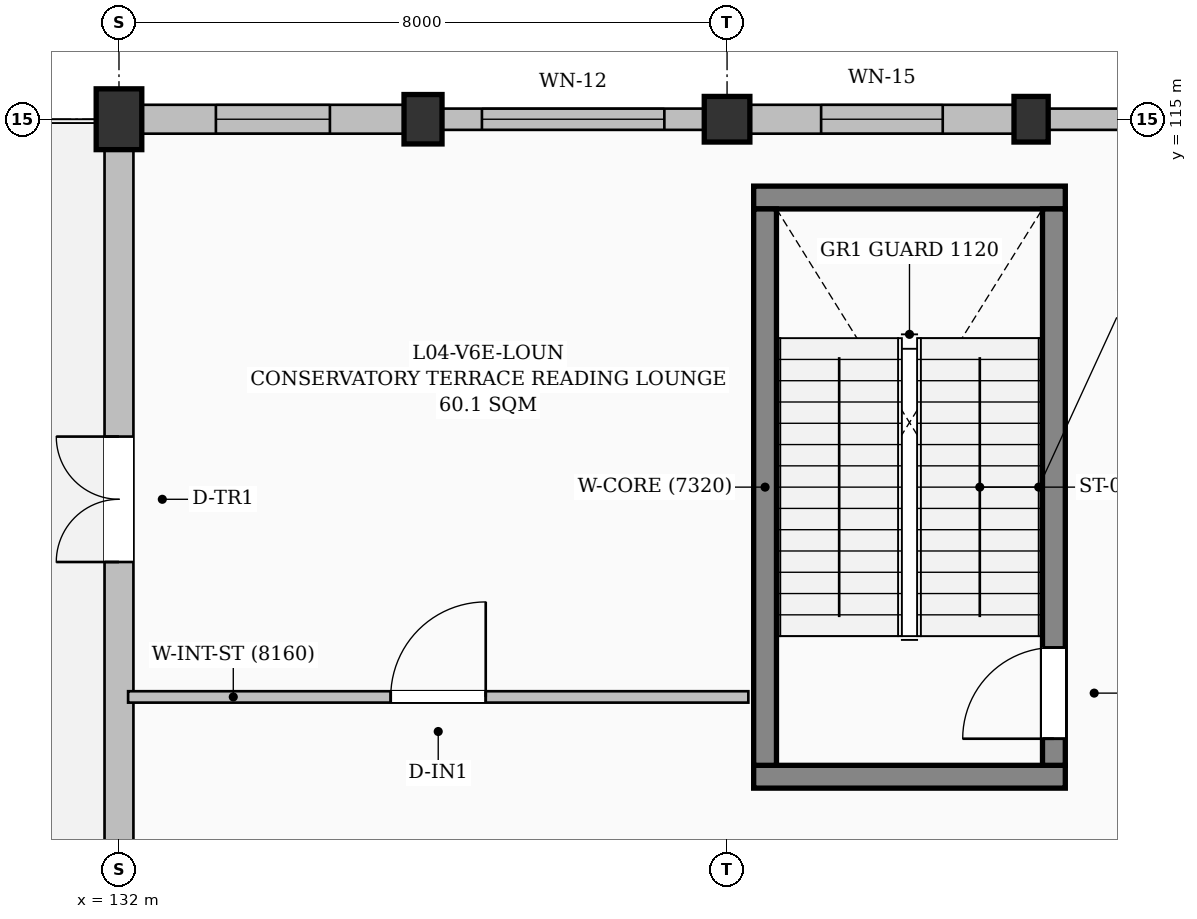
"""IFC4 building model, lengths in metres.
Left out: names, types, materials, properties, quantities, classifications, styles, units other than length and angle.
Written with IfcOpenShell. Run it as: python <this file> out.ifc"""

import sys

from ifc_helpers import new_model, si_unit, direction, frame, frame_2d, origin, origin_2d, place, context, subcontext, project, spatial, rectangle, extrude, element, fill, save


model = new_model("IFC4")
c1 = context("Model", 3, precision=1e-05, world=origin(), true_north=direction((0.0, 1.0)))
c2 = subcontext(c1, "Body", "Model", "MODEL_VIEW")
j1 = project(units=[si_unit("LENGTHUNIT", "METRE"), si_unit("PLANEANGLEUNIT", "RADIAN")], contexts=[c1])
p1 = place(None, origin())
s1 = spatial("IfcSite", under=j1, at=p1, CompositionType="ELEMENT")
p2 = place(p1, origin())
s2 = spatial("IfcBuilding", under=s1, at=p2, CompositionType="ELEMENT")
p3 = place(p2, frame((0.0, 0.0, 18.3)))
s3 = spatial("IfcBuildingStorey", under=s2, at=p3, CompositionType="ELEMENT", Elevation=18.3)
p4 = place(p3, frame((132.0, 115.0, 0.0), z_axis=(0.0, 0.0, 1.0), x_axis=(1.0, 0.0, 0.0)))
e1 = element("IfcColumn", 1, at=p4, inside=s3, PredefinedType="COLUMN", context=c2, shape_type="SweptSolid", body=[
    extrude(rectangle(XDim=0.6, YDim=0.8, at=origin_2d()), origin(), (0.0, 0.0, 1.0), 4.5),
])
p5 = place(p3, frame((136.0, 115.0, 0.0), z_axis=(0.0, 0.0, 1.0), x_axis=(1.0, 0.0, 0.0)))
e2 = element("IfcColumn", 2, at=p5, inside=s3, PredefinedType="PILASTER", context=c2, shape_type="SweptSolid", body=[
    extrude(rectangle(XDim=0.5, YDim=0.65, at=origin_2d()), origin(), (0.0, 0.0, 1.0), 4.5),
])
p6 = place(p3, frame((140.0, 115.0, 0.0), z_axis=(0.0, 0.0, 1.0), x_axis=(1.0, 0.0, 0.0)))
e3 = element("IfcColumn", 3, at=p6, inside=s3, PredefinedType="COLUMN", context=c2, shape_type="SweptSolid", body=[
    extrude(rectangle(XDim=0.6, YDim=0.6, at=origin_2d()), origin(), (0.0, 0.0, 1.0), 4.5),
])
p7 = place(p3, frame((144.0, 115.0, 0.0), z_axis=(0.0, 0.0, 1.0), x_axis=(1.0, 0.0, 0.0)))
e4 = element("IfcColumn", 4, at=p7, inside=s3, PredefinedType="PILASTER", context=c2, shape_type="SweptSolid", body=[
    extrude(rectangle(XDim=0.45, YDim=0.6, at=origin_2d()), origin(), (0.0, 0.0, 1.0), 4.5),
])
p8 = place(p3, frame((132.0, 105.4, 0.0), z_axis=(0.0, 0.0, 1.0), x_axis=(0.0, 1.0, 0.0)))
e5 = element("IfcWall", 5, at=p8, inside=s3, PredefinedType="SOLIDWALL", context=c2, shape_type="SweptSolid", body=[
    extrude(rectangle(XDim=9.2, YDim=0.38, at=frame_2d((4.6, 0.0))), origin(), (0.0, 0.0, 1.0), 4.2),
])
p9 = place(p8, frame((3.775, 0.0, 0.0)))
e6 = element("IfcOpeningElement", 6, at=p9, cuts=e5, PredefinedType="OPENING", context=c2, shape_type="SweptSolid", body=[
    extrude(rectangle(XDim=1.65, YDim=2.25, at=frame_2d((0.825, 1.125))), frame((0.0, 0.2, 0.0), z_axis=(0.0, -1.0, 0.0), x_axis=(1.0, 0.0, 0.0)), (0.0, 0.0, 1.0), 0.4),
])
p10 = place(p3, frame((132.3, 115.0, 0.0), z_axis=(0.0, 0.0, 1.0), x_axis=(1.0, 0.0, 0.0)))
e7 = element("IfcWall", 7, at=p10, inside=s3, PredefinedType="SOLIDWALL", context=c2, shape_type="SweptSolid", body=[
    extrude(rectangle(XDim=3.45, YDim=0.38, at=frame_2d((1.725, 0.0))), origin(), (0.0, 0.0, 1.0), 4.2),
])
p11 = place(p10, frame((0.975, 0.0, 0.95)))
e8 = element("IfcOpeningElement", 8, at=p11, cuts=e7, PredefinedType="OPENING", context=c2, shape_type="SweptSolid", body=[
    extrude(rectangle(XDim=1.5, YDim=1.5, at=frame_2d((0.75, 0.75))), frame((0.0, 0.2, 0.0), z_axis=(0.0, -1.0, 0.0), x_axis=(1.0, 0.0, 0.0)), (0.0, 0.0, 1.0), 0.4),
])
p12 = place(p3, frame((136.25, 115.0, 0.0), z_axis=(0.0, 0.0, 1.0), x_axis=(1.0, 0.0, 0.0)))
e9 = element("IfcWall", 9, at=p12, inside=s3, PredefinedType="SOLIDWALL", context=c2, shape_type="SweptSolid", body=[
    extrude(rectangle(XDim=3.45, YDim=0.28, at=frame_2d((1.725, 0.0))), origin(), (0.0, 0.0, 1.0), 4.2),
])
p13 = place(p12, frame((0.525, 0.0, 0.95)))
e10 = element("IfcOpeningElement", 10, at=p13, cuts=e9, PredefinedType="OPENING", context=c2, shape_type="SweptSolid", body=[
    extrude(rectangle(XDim=2.4, YDim=1.5, at=frame_2d((1.2, 0.75))), frame((0.0, 0.15, 0.0), z_axis=(0.0, -1.0, 0.0), x_axis=(1.0, 0.0, 0.0)), (0.0, 0.0, 1.0), 0.3),
])
p14 = place(p3, frame((140.3, 115.0, 0.0), z_axis=(0.0, 0.0, 1.0), x_axis=(1.0, 0.0, 0.0)))
e11 = element("IfcWall", 11, at=p14, inside=s3, PredefinedType="SOLIDWALL", context=c2, shape_type="SweptSolid", body=[
    extrude(rectangle(XDim=3.475, YDim=0.38, at=frame_2d((1.737, 0.0))), origin(), (0.0, 0.0, 1.0), 3.585),
])
p15 = place(p14, frame((0.938, 0.0, 0.95)))
e12 = element("IfcOpeningElement", 12, at=p15, cuts=e11, PredefinedType="OPENING", context=c2, shape_type="SweptSolid", body=[
    extrude(rectangle(XDim=1.6, YDim=1.2, at=frame_2d((0.8, 0.6))), frame((0.0, 0.2, 0.0), z_axis=(0.0, -1.0, 0.0), x_axis=(1.0, 0.0, 0.0)), (0.0, 0.0, 1.0), 0.4),
])
p16 = place(p3, frame((144.225, 115.0, 0.0), z_axis=(0.0, 0.0, 1.0), x_axis=(1.0, 0.0, 0.0)))
e13 = element("IfcWall", 13, at=p16, inside=s3, PredefinedType="SOLIDWALL", context=c2, shape_type="SweptSolid", body=[
    extrude(rectangle(XDim=3.475, YDim=0.28, at=frame_2d((1.737, 0.0))), origin(), (0.0, 0.0, 1.0), 3.585),
])
p17 = place(p16, frame((1.288, 0.0, 0.95)))
e14 = element("IfcOpeningElement", 14, at=p17, cuts=e13, PredefinedType="OPENING", context=c2, shape_type="SweptSolid", body=[
    extrude(rectangle(XDim=0.9, YDim=1.8, at=frame_2d((0.45, 0.9))), frame((0.0, 0.15, 0.0), z_axis=(0.0, -1.0, 0.0), x_axis=(1.0, 0.0, 0.0)), (0.0, 0.0, 1.0), 0.3),
])
for number, where, z_axis, x_axis in (
    (15, (140.35, 106.35, 0.0), (0.0, 0.0, 1.0), (1.0, 0.0, 0.0)),
    (16, (144.45, 113.97, 0.0), (0.0, 0.0, 1.0), (-1.0, 0.0, 0.0)),
):
    element("IfcWall", number, at=place(p3, frame(where, z_axis=z_axis, x_axis=x_axis)), inside=s3, PredefinedType="SHEAR", context=c2, shape_type="SweptSolid", body=[
        extrude(rectangle(XDim=4.1, YDim=0.3, at=frame_2d((2.05, 0.0))), origin(), (0.0, 0.0, 1.0), 4.2),
    ])
p18 = place(p3, frame((140.5, 106.5, 0.0), z_axis=(0.0, 0.0, 1.0), x_axis=(0.0, 1.0, 0.0)))
e17 = element("IfcWall", 17, at=p18, inside=s3, PredefinedType="SHEAR", context=c2, shape_type="SweptSolid", body=[
    extrude(rectangle(XDim=7.32, YDim=0.3, at=frame_2d((3.66, 0.0))), origin(), (0.0, 0.0, 1.0), 4.2),
])
p19 = place(p3, frame((144.3, 106.5, 0.0), z_axis=(0.0, 0.0, 1.0), x_axis=(0.0, 1.0, 0.0)))
e18 = element("IfcWall", 18, at=p19, inside=s3, PredefinedType="SHEAR", context=c2, shape_type="SweptSolid", body=[
    extrude(rectangle(XDim=7.32, YDim=0.3, at=frame_2d((3.66, 0.0))), origin(), (0.0, 0.0, 1.0), 4.2),
])
p20 = place(p19, frame((0.35, 0.0, 0.0)))
e19 = element("IfcOpeningElement", 19, at=p20, cuts=e18, PredefinedType="OPENING", context=c2, shape_type="SweptSolid", body=[
    extrude(rectangle(XDim=1.2, YDim=2.15, at=frame_2d((0.6, 1.075))), frame((0.0, 0.16, 0.0), z_axis=(0.0, -1.0, 0.0), x_axis=(1.0, 0.0, 0.0)), (0.0, 0.0, 1.0), 0.32),
])
p21 = place(p3, frame((132.12, 107.4, 0.0), z_axis=(0.0, 0.0, 1.0), x_axis=(1.0, 0.0, 0.0)))
e20 = element("IfcWall", 20, at=p21, inside=s3, PredefinedType="PARTITIONING", context=c2, shape_type="SweptSolid", body=[
    extrude(rectangle(XDim=8.16, YDim=0.15, at=frame_2d((4.08, 0.0))), origin(), (0.0, 0.0, 1.0), 4.2),
])
p22 = place(p21, frame((3.455, 0.0, 0.0)))
e21 = element("IfcOpeningElement", 21, at=p22, cuts=e20, PredefinedType="OPENING", context=c2, shape_type="SweptSolid", body=[
    extrude(rectangle(XDim=1.25, YDim=2.15, at=frame_2d((0.625, 1.075))), frame((0.0, 0.085, 0.0), z_axis=(0.0, -1.0, 0.0), x_axis=(1.0, 0.0, 0.0)), (0.0, 0.0, 1.0), 0.17),
])
p23 = place(p9, origin())
e22 = element("IfcDoor", 22, at=p23, inside=s3, OperationType="DOUBLE_DOOR_SINGLE_SWING", PredefinedType="DOOR", context=c2, shape_type="SweptSolid", body=[
    extrude(rectangle(XDim=1.65, YDim=2.25, at=frame_2d((0.825, 1.125))), frame((0.0, 0.025, 0.0), z_axis=(0.0, -1.0, 0.0), x_axis=(1.0, 0.0, 0.0)), (0.0, 0.0, 1.0), 0.05),
])
fill(e6, e22)
p24 = place(p11, origin())
e23 = element("IfcWindow", 23, at=p24, inside=s3, PartitioningType="DOUBLE_PANEL_VERTICAL", PredefinedType="WINDOW", context=c2, shape_type="SweptSolid", body=[
    extrude(rectangle(XDim=1.5, YDim=1.5, at=frame_2d((0.75, 0.75))), frame((0.0, 0.03, 0.0), z_axis=(0.0, -1.0, 0.0), x_axis=(1.0, 0.0, 0.0)), (0.0, 0.0, 1.0), 0.06),
])
fill(e8, e23)
p25 = place(p13, origin())
e24 = element("IfcWindow", 24, at=p25, inside=s3, PartitioningType="TRIPLE_PANEL_VERTICAL", PredefinedType="WINDOW", context=c2, shape_type="SweptSolid", body=[
    extrude(rectangle(XDim=2.4, YDim=1.5, at=frame_2d((1.2, 0.75))), frame((0.0, 0.03, 0.0), z_axis=(0.0, -1.0, 0.0), x_axis=(1.0, 0.0, 0.0)), (0.0, 0.0, 1.0), 0.06),
])
fill(e10, e24)
p26 = place(p15, origin())
e25 = element("IfcWindow", 25, at=p26, inside=s3, PartitioningType="DOUBLE_PANEL_HORIZONTAL", PredefinedType="WINDOW", context=c2, shape_type="SweptSolid", body=[
    extrude(rectangle(XDim=1.6, YDim=1.2, at=frame_2d((0.8, 0.6))), frame((0.0, 0.03, 0.0), z_axis=(0.0, -1.0, 0.0), x_axis=(1.0, 0.0, 0.0)), (0.0, 0.0, 1.0), 0.06),
])
fill(e12, e25)
p27 = place(p20, origin())
e26 = element("IfcDoor", 26, at=p27, inside=s3, OperationType="SINGLE_SWING_LEFT", PredefinedType="DOOR", context=c2, shape_type="SweptSolid", body=[
    extrude(rectangle(XDim=1.2, YDim=2.15, at=frame_2d((0.6, 1.075))), frame((0.0, 0.025, 0.0), z_axis=(0.0, -1.0, 0.0), x_axis=(1.0, 0.0, 0.0)), (0.0, 0.0, 1.0), 0.05),
])
fill(e19, e26)
p28 = place(p22, origin())
e27 = element("IfcDoor", 27, at=p28, inside=s3, OperationType="SINGLE_SWING_RIGHT", PredefinedType="DOOR", context=c2, shape_type="SweptSolid", body=[
    extrude(rectangle(XDim=1.25, YDim=2.15, at=frame_2d((0.625, 1.075))), frame((0.0, 0.025, 0.0), z_axis=(0.0, -1.0, 0.0), x_axis=(1.0, 0.0, 0.0)), (0.0, 0.0, 1.0), 0.05),
])
fill(e21, e27)
save(model, sys.argv[1])
